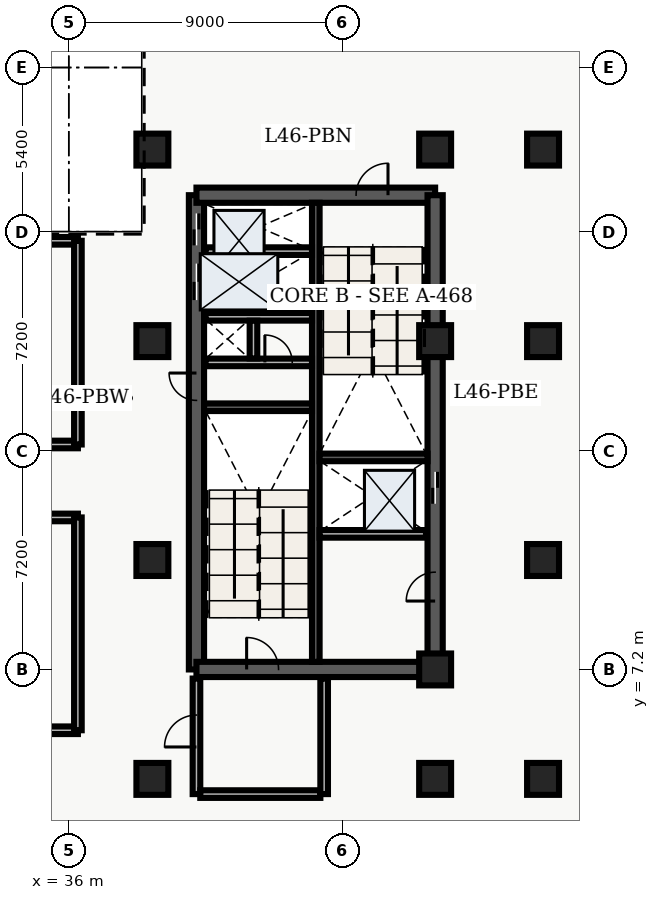
"""IFC4 building model, lengths in metres.
Left out: names, types, materials, properties, quantities, classifications, styles, units other than length and angle.
Written with IfcOpenShell. Run it as: python <this file> out.ifc"""

import sys

from ifc_helpers import new_model, entity, si_unit, converted_unit, direction, frame, origin_with_axes, origin_2d_with_axis, place, context, subcontext, project, spatial, polyline, rectangle, outline, extrude, element, fill, save


model = new_model("IFC4")
c1 = context("Model", 3, precision=1e-05, world=origin_with_axes(), true_north=direction((0.0, 1.0)))
c2 = subcontext(c1, "Body", "Model", "MODEL_VIEW")
j1 = project(units=[si_unit("LENGTHUNIT", "METRE"), converted_unit("PLANEANGLEUNIT", "DEGREE", entity("IfcPlaneAngleMeasure", 0.017), si_unit("PLANEANGLEUNIT", "RADIAN"), dimensions=[0, 0, 0, 0, 0, 0, 0])], contexts=[c1])
p1 = place(None, origin_with_axes())
s1 = spatial("IfcSite", under=j1, at=p1, CompositionType="ELEMENT")
p2 = place(p1, origin_with_axes())
s2 = spatial("IfcBuilding", under=s1, at=p2, CompositionType="ELEMENT")
p3 = place(p2, frame((0.0, 0.0, 187.5), z_axis=(0.0, 0.0, 1.0), x_axis=(1.0, 0.0, 0.0)))
s3 = spatial("IfcBuildingStorey", under=s2, at=p3, CompositionType="ELEMENT", Elevation=187.5)
p4 = place(p3, frame((40.2, 7.2, 0.0), z_axis=(0.0, 0.0, 1.0), x_axis=(0.0, 1.0, 0.0)))
e1 = element("IfcWall", 1, at=p4, inside=s3, PredefinedType="SHEAR", context=c2, shape_type="SweptSolid", body=[
    extrude(outline(polyline([(0.0, -0.25), (15.6, -0.25), (15.6, 0.25), (0.0, 0.25), (0.0, -0.25)])), origin_with_axes(), (0.0, 0.0, 1.0), 4.86),
])
p5 = place(p4, frame((14.475, 0.0, 0.0), z_axis=(0.0, 0.0, 1.0), x_axis=(1.0, 0.0, 0.0)))
e2 = element("IfcOpeningElement", 2, at=p5, cuts=e1, PredefinedType="OPENING", context=c2, shape_type="SweptSolid", body=[
    extrude(rectangle(XDim=1.05, YDim=0.52, at=origin_2d_with_axis()), origin_with_axes(), (0.0, 0.0, 1.0), 2.15),
])
p6 = place(p4, frame((12.75, 0.0, 0.0), z_axis=(0.0, 0.0, 1.0), x_axis=(1.0, 0.0, 0.0)))
e3 = element("IfcOpeningElement", 3, at=p6, cuts=e1, PredefinedType="OPENING", context=c2, shape_type="SweptSolid", body=[
    extrude(rectangle(XDim=1.2, YDim=0.52, at=origin_2d_with_axis()), origin_with_axes(), (0.0, 0.0, 1.0), 2.15),
])
p7 = place(p4, frame((9.3, 0.0, 0.0), z_axis=(0.0, 0.0, 1.0), x_axis=(1.0, 0.0, 0.0)))
e4 = element("IfcOpeningElement", 4, at=p7, cuts=e1, PredefinedType="OPENING", context=c2, shape_type="SweptSolid", body=[
    extrude(rectangle(XDim=0.9, YDim=0.52, at=origin_2d_with_axis()), origin_with_axes(), (0.0, 0.0, 1.0), 2.15),
])
p8 = place(p3, frame((40.2, 7.2, 0.0), z_axis=(0.0, 0.0, 1.0), x_axis=(1.0, 0.0, 0.0)))
e5 = element("IfcWall", 5, at=p8, inside=s3, PredefinedType="SHEAR", context=c2, shape_type="SweptSolid", body=[
    extrude(outline(polyline([(0.0, -0.25), (7.85, -0.25), (7.85, 0.25), (0.0, 0.25), (0.0, -0.25)])), origin_with_axes(), (0.0, 0.0, 1.0), 4.86),
])
p9 = place(p8, frame((2.175, 0.0, 0.0), z_axis=(0.0, 0.0, 1.0), x_axis=(1.0, 0.0, 0.0)))
e6 = element("IfcOpeningElement", 6, at=p9, cuts=e5, PredefinedType="OPENING", context=c2, shape_type="SweptSolid", body=[
    extrude(rectangle(XDim=1.05, YDim=0.52, at=origin_2d_with_axis()), origin_with_axes(), (0.0, 0.0, 1.0), 2.15),
])
p10 = place(p3, frame((40.2, 22.8, 0.0), z_axis=(0.0, 0.0, 1.0), x_axis=(1.0, 0.0, 0.0)))
e7 = element("IfcWall", 7, at=p10, inside=s3, PredefinedType="SHEAR", context=c2, shape_type="SweptSolid", body=[
    extrude(outline(polyline([(0.0, -0.25), (7.85, -0.25), (7.85, 0.25), (0.0, 0.25), (0.0, -0.25)])), origin_with_axes(), (0.0, 0.0, 1.0), 4.86),
])
p11 = place(p10, frame((5.775, 0.0, 0.0), z_axis=(0.0, 0.0, 1.0), x_axis=(1.0, 0.0, 0.0)))
e8 = element("IfcOpeningElement", 8, at=p11, cuts=e7, PredefinedType="OPENING", context=c2, shape_type="SweptSolid", body=[
    extrude(rectangle(XDim=1.05, YDim=0.52, at=origin_2d_with_axis()), origin_with_axes(), (0.0, 0.0, 1.0), 2.15),
])
p12 = place(p3, frame((48.05, 7.2, 0.0), z_axis=(0.0, 0.0, 1.0), x_axis=(0.0, 1.0, 0.0)))
e9 = element("IfcWall", 9, at=p12, inside=s3, PredefinedType="SHEAR", context=c2, shape_type="SweptSolid", body=[
    extrude(outline(polyline([(0.0, -0.25), (15.6, -0.25), (15.6, 0.25), (0.0, 0.25), (0.0, -0.25)])), origin_with_axes(), (0.0, 0.0, 1.0), 4.86),
])
p13 = place(p12, frame((5.975, 0.0, 0.0), z_axis=(0.0, 0.0, 1.0), x_axis=(1.0, 0.0, 0.0)))
e10 = element("IfcOpeningElement", 10, at=p13, cuts=e9, PredefinedType="OPENING", context=c2, shape_type="SweptSolid", body=[
    extrude(rectangle(XDim=1.05, YDim=0.52, at=origin_2d_with_axis()), origin_with_axes(), (0.0, 0.0, 1.0), 2.15),
])
p14 = place(p12, frame((2.725, 0.0, 0.0), z_axis=(0.0, 0.0, 1.0), x_axis=(1.0, 0.0, 0.0)))
e11 = element("IfcOpeningElement", 11, at=p14, cuts=e9, PredefinedType="OPENING", context=c2, shape_type="SweptSolid", body=[
    extrude(rectangle(XDim=0.95, YDim=0.52, at=origin_2d_with_axis()), origin_with_axes(), (0.0, 0.0, 1.0), 2.15),
])
p15 = place(p3, frame((44.125, 7.45, 0.0), z_axis=(0.0, 0.0, 1.0), x_axis=(0.0, 1.0, 0.0)))
e12 = element("IfcWall", 12, at=p15, inside=s3, PredefinedType="SHEAR", context=c2, shape_type="SweptSolid", body=[
    extrude(outline(polyline([(0.0, -0.125), (15.1, -0.125), (15.1, 0.125), (0.0, 0.125), (0.0, -0.125)])), origin_with_axes(), (0.0, 0.0, 1.0), 4.86),
])
for number, where, z_axis, x_axis in (
    (13, (40.45, 15.825, 0.0), (0.0, 0.0, 1.0), (1.0, 0.0, 0.0)),
    (14, (44.25, 14.175, 0.0), (0.0, 0.0, 1.0), (1.0, 0.0, 0.0)),
):
    element("IfcWall", number, at=place(p3, frame(where, z_axis=z_axis, x_axis=x_axis)), inside=s3, PredefinedType="SHEAR", context=c2, shape_type="SweptSolid", body=[
        extrude(outline(polyline([(0.0, -0.125), (3.55, -0.125), (3.55, 0.125), (0.0, 0.125), (0.0, -0.125)])), origin_with_axes(), (0.0, 0.0, 1.0), 4.86),
    ])
p16 = place(p3, frame((40.5, 17.3, 0.0), z_axis=(0.0, 0.0, 1.0), x_axis=(1.0, 0.0, 0.0)))
e15 = element("IfcWall", 15, at=p16, inside=s3, PredefinedType="SOLIDWALL", context=c2, shape_type="SweptSolid", body=[
    extrude(outline(polyline([(0.0, -0.125), (3.5, -0.125), (3.5, 0.125), (0.0, 0.125), (0.0, -0.125)])), origin_with_axes(), (0.0, 0.0, 1.0), 3.6),
])
p17 = place(p16, frame((2.4, 0.0, 0.0), z_axis=(0.0, 0.0, 1.0), x_axis=(1.0, 0.0, 0.0)))
e16 = element("IfcOpeningElement", 16, at=p17, cuts=e15, PredefinedType="OPENING", context=c2, shape_type="SweptSolid", body=[
    extrude(rectangle(XDim=0.9, YDim=0.27, at=origin_2d_with_axis()), origin_with_axes(), (0.0, 0.0, 1.0), 2.15),
])
p18 = place(p3, frame((40.5, 18.8, 0.0), z_axis=(0.0, 0.0, 1.0), x_axis=(1.0, 0.0, 0.0)))
e17 = element("IfcWall", 17, at=p18, inside=s3, PredefinedType="SOLIDWALL", context=c2, shape_type="SweptSolid", body=[
    extrude(outline(polyline([(0.0, -0.125), (3.5, -0.125), (3.5, 0.125), (0.0, 0.125), (0.0, -0.125)])), origin_with_axes(), (0.0, 0.0, 1.0), 3.6),
])
p19 = place(p3, frame((42.075, 17.43, 0.0), z_axis=(0.0, 0.0, 1.0), x_axis=(0.0, 1.0, 0.0)))
e18 = element("IfcWall", 18, at=p19, inside=s3, PredefinedType="SOLIDWALL", context=c2, shape_type="SweptSolid", body=[
    extrude(outline(polyline([(0.0, -0.125), (1.24, -0.125), (1.24, 0.125), (0.0, 0.125), (0.0, -0.125)])), origin_with_axes(), (0.0, 0.0, 1.0), 3.6),
])
p20 = place(p3, frame((40.2, 3.1, 0.0), z_axis=(0.0, 0.0, 1.0), x_axis=(0.0, 1.0, 0.0)))
e19 = element("IfcWall", 19, at=p20, inside=s3, PredefinedType="SOLIDWALL", context=c2, shape_type="SweptSolid", body=[
    extrude(outline(polyline([(0.0, -0.125), (3.8, -0.125), (3.8, 0.125), (0.0, 0.125), (0.0, -0.125)])), origin_with_axes(), (0.0, 0.0, 1.0), 3.6),
])
p21 = place(p20, frame((2.075, 0.0, 0.0), z_axis=(0.0, 0.0, 1.0), x_axis=(1.0, 0.0, 0.0)))
e20 = element("IfcOpeningElement", 20, at=p21, cuts=e19, PredefinedType="OPENING", context=c2, shape_type="SweptSolid", body=[
    extrude(rectangle(XDim=1.05, YDim=0.27, at=origin_2d_with_axis()), origin_with_axes(), (0.0, 0.0, 1.0), 2.15),
])
p22 = place(p3, frame((40.325, 3.1, 0.0), z_axis=(0.0, 0.0, 1.0), x_axis=(1.0, 0.0, 0.0)))
e21 = element("IfcWall", 21, at=p22, inside=s3, PredefinedType="SOLIDWALL", context=c2, shape_type="SweptSolid", body=[
    extrude(outline(polyline([(0.0, -0.125), (3.95, -0.125), (3.95, 0.125), (0.0, 0.125), (0.0, -0.125)])), origin_with_axes(), (0.0, 0.0, 1.0), 3.6),
])
p23 = place(p3, frame((44.4, 3.1, 0.0), z_axis=(0.0, 0.0, 1.0), x_axis=(0.0, 1.0, 0.0)))
e22 = element("IfcWall", 22, at=p23, inside=s3, PredefinedType="SOLIDWALL", context=c2, shape_type="SweptSolid", body=[
    extrude(outline(polyline([(0.0, -0.125), (3.8, -0.125), (3.8, 0.125), (0.0, 0.125), (0.0, -0.125)])), origin_with_axes(), (0.0, 0.0, 1.0), 3.6),
])
for number, where, z_axis, x_axis in (
    (23, (38.75, 3.6, 0.0), (0.0, 0.0, 1.0), (1.0, 0.0, 0.0)),
    (24, (38.75, 10.8, 0.0), (0.0, 0.0, 1.0), (1.0, 0.0, 0.0)),
    (25, (38.75, 18.0, 0.0), (0.0, 0.0, 1.0), (1.0, 0.0, 0.0)),
    (26, (38.75, 24.3, 0.0), (0.0, 0.0, 1.0), (1.0, 0.0, 0.0)),
    (27, (48.05, 3.6, 0.0), (0.0, 0.0, 1.0), (1.0, 0.0, 0.0)),
    (28, (48.05, 7.2, 0.0), (0.0, 0.0, 1.0), (1.0, 0.0, 0.0)),
    (29, (48.05, 18.0, 0.0), (0.0, 0.0, 1.0), (1.0, 0.0, 0.0)),
    (30, (48.05, 24.3, 0.0), (0.0, 0.0, 1.0), (1.0, 0.0, 0.0)),
    (31, (51.6, 3.6, 0.0), (0.0, 0.0, 1.0), (1.0, 0.0, 0.0)),
    (32, (51.6, 10.8, 0.0), (0.0, 0.0, 1.0), (1.0, 0.0, 0.0)),
    (33, (51.6, 18.0, 0.0), (0.0, 0.0, 1.0), (1.0, 0.0, 0.0)),
    (34, (51.6, 24.3, 0.0), (0.0, 0.0, 1.0), (1.0, 0.0, 0.0)),
):
    element("IfcColumn", number, at=place(p3, frame(where, z_axis=z_axis, x_axis=x_axis)), inside=s3, PredefinedType="COLUMN", context=c2, shape_type="SweptSolid", body=[
        extrude(rectangle(XDim=1.05, YDim=1.05, at=origin_2d_with_axis()), origin_with_axes(), (0.0, 0.0, 1.0), 5.1),
    ])
for number, where, z_axis, x_axis in (
    (35, (40.5, 20.96, 0.0), (0.0, 0.0, 1.0), (1.0, 0.0, 0.0)),
    (36, (44.25, 11.66, 0.0), (0.0, 0.0, 1.0), (1.0, 0.0, 0.0)),
):
    element("IfcWall", number, at=place(p3, frame(where, z_axis=z_axis, x_axis=x_axis)), inside=s3, PredefinedType="SOLIDWALL", context=c2, shape_type="SweptSolid", body=[
        extrude(outline(polyline([(0.0, -0.125), (3.5, -0.125), (3.5, 0.125), (0.0, 0.125), (0.0, -0.125)])), origin_with_axes(), (0.0, 0.0, 1.0), 3.2),
    ])
for number, where, z_axis, x_axis in (
    (37, (21.22, 21.3, 0.0), (0.0, 0.0, 1.0), (1.0, 0.0, 0.0)),
    (38, (21.22, 12.2, 0.0), (0.0, 0.0, 1.0), (1.0, 0.0, 0.0)),
):
    element("IfcWall", number, at=place(p3, frame(where, z_axis=z_axis, x_axis=x_axis)), inside=s3, PredefinedType="SOLIDWALL", context=c2, shape_type="SweptSolid", body=[
        extrude(outline(polyline([(0.0, -0.125), (15.08, -0.125), (15.08, 0.125), (0.0, 0.125), (0.0, -0.125)])), origin_with_axes(), (0.0, 0.0, 1.0), 3.2),
    ])
p24 = place(p3, frame((21.22, 14.6, 0.0), z_axis=(0.0, 0.0, 1.0), x_axis=(1.0, 0.0, 0.0)))
e39 = element("IfcWall", 39, at=p24, inside=s3, PredefinedType="SOLIDWALL", context=c2, shape_type="SweptSolid", body=[
    extrude(outline(polyline([(0.0, -0.125), (15.08, -0.125), (15.08, 0.125), (0.0, 0.125), (0.0, -0.125)])), origin_with_axes(), (0.0, 0.0, 1.0), 3.2),
])
p25 = place(p24, frame((7.75, 0.0, 0.0), z_axis=(0.0, 0.0, 1.0), x_axis=(1.0, 0.0, 0.0)))
e40 = element("IfcOpeningElement", 40, at=p25, cuts=e39, PredefinedType="OPENING", context=c2, shape_type="SweptSolid", body=[
    extrude(rectangle(XDim=1.1, YDim=0.27, at=origin_2d_with_axis()), origin_with_axes(), (0.0, 0.0, 1.0), 2.15),
])
p26 = place(p3, frame((36.3, 14.6, 0.0), z_axis=(0.0, 0.0, 1.0), x_axis=(0.0, 1.0, 0.0)))
e41 = element("IfcWall", 41, at=p26, inside=s3, PredefinedType="SOLIDWALL", context=c2, shape_type="SweptSolid", body=[
    extrude(outline(polyline([(0.0, -0.125), (6.7, -0.125), (6.7, 0.125), (0.0, 0.125), (0.0, -0.125)])), origin_with_axes(), (0.0, 0.0, 1.0), 3.2),
])
p27 = place(p3, frame((21.22, 5.2, 0.0), z_axis=(0.0, 0.0, 1.0), x_axis=(1.0, 0.0, 0.0)))
e42 = element("IfcWall", 42, at=p27, inside=s3, PredefinedType="SOLIDWALL", context=c2, shape_type="SweptSolid", body=[
    extrude(outline(polyline([(0.0, -0.125), (15.08, -0.125), (15.08, 0.125), (0.0, 0.125), (0.0, -0.125)])), origin_with_axes(), (0.0, 0.0, 1.0), 3.2),
])
p28 = place(p3, frame((36.3, 5.2, 0.0), z_axis=(0.0, 0.0, 1.0), x_axis=(0.0, 1.0, 0.0)))
e43 = element("IfcWall", 43, at=p28, inside=s3, PredefinedType="SOLIDWALL", context=c2, shape_type="SweptSolid", body=[
    extrude(outline(polyline([(0.0, -0.125), (7.0, -0.125), (7.0, 0.125), (0.0, 0.125), (0.0, -0.125)])), origin_with_axes(), (0.0, 0.0, 1.0), 3.2),
])
p29 = place(p12, frame((5.975, 0.0, 0.0), z_axis=(0.0, 0.0, 1.0), x_axis=(1.0, 0.0, 0.0)))
e44 = element("IfcDoor", 44, at=p29, inside=s3, OperationType="SLIDING_TO_LEFT", PredefinedType="DOOR", context=c2, shape_type="SweptSolid", body=[
    extrude(rectangle(XDim=1.05, YDim=0.09, at=origin_2d_with_axis()), origin_with_axes(), (0.0, 0.0, 1.0), 2.15),
])
fill(e10, e44)
p30 = place(p4, frame((14.475, 0.0, 0.0), z_axis=(0.0, 0.0, 1.0), x_axis=(1.0, 0.0, 0.0)))
e45 = element("IfcDoor", 45, at=p30, inside=s3, OperationType="SLIDING_TO_RIGHT", PredefinedType="DOOR", context=c2, shape_type="SweptSolid", body=[
    extrude(rectangle(XDim=1.05, YDim=0.09, at=origin_2d_with_axis()), origin_with_axes(), (0.0, 0.0, 1.0), 2.15),
])
fill(e2, e45)
p31 = place(p4, frame((12.75, 0.0, 0.0), z_axis=(0.0, 0.0, 1.0), x_axis=(1.0, 0.0, 0.0)))
e46 = element("IfcDoor", 46, at=p31, inside=s3, OperationType="DOUBLE_DOOR_SLIDING", PredefinedType="DOOR", context=c2, shape_type="SweptSolid", body=[
    extrude(rectangle(XDim=1.2, YDim=0.09, at=origin_2d_with_axis()), origin_with_axes(), (0.0, 0.0, 1.0), 2.15),
])
fill(e3, e46)
p32 = place(p4, frame((9.3, 0.0, 0.0), z_axis=(0.0, 0.0, 1.0), x_axis=(1.0, 0.0, 0.0)))
e47 = element("IfcDoor", 47, at=p32, inside=s3, OperationType="SINGLE_SWING_RIGHT", PredefinedType="DOOR", context=c2, shape_type="SweptSolid", body=[
    extrude(rectangle(XDim=0.9, YDim=0.09, at=origin_2d_with_axis()), origin_with_axes(), (0.0, 0.0, 1.0), 2.15),
])
fill(e4, e47)
p33 = place(p16, frame((2.4, 0.0, 0.0), z_axis=(0.0, 0.0, 1.0), x_axis=(1.0, 0.0, 0.0)))
e48 = element("IfcDoor", 48, at=p33, inside=s3, OperationType="SINGLE_SWING_LEFT", PredefinedType="DOOR", context=c2, shape_type="SweptSolid", body=[
    extrude(rectangle(XDim=0.9, YDim=0.09, at=origin_2d_with_axis()), origin_with_axes(), (0.0, 0.0, 1.0), 2.15),
])
fill(e16, e48)
p34 = place(p8, frame((2.175, 0.0, 0.0), z_axis=(0.0, 0.0, 1.0), x_axis=(1.0, 0.0, 0.0)))
e49 = element("IfcDoor", 49, at=p34, inside=s3, OperationType="SINGLE_SWING_LEFT", PredefinedType="DOOR", context=c2, shape_type="SweptSolid", body=[
    extrude(rectangle(XDim=1.05, YDim=0.09, at=origin_2d_with_axis()), origin_with_axes(), (0.0, 0.0, 1.0), 2.15),
])
fill(e6, e49)
p35 = place(p10, frame((5.775, 0.0, 0.0), z_axis=(0.0, 0.0, 1.0), x_axis=(1.0, 0.0, 0.0)))
e50 = element("IfcDoor", 50, at=p35, inside=s3, OperationType="SINGLE_SWING_RIGHT", PredefinedType="DOOR", context=c2, shape_type="SweptSolid", body=[
    extrude(rectangle(XDim=1.05, YDim=0.09, at=origin_2d_with_axis()), origin_with_axes(), (0.0, 0.0, 1.0), 2.15),
])
fill(e8, e50)
p36 = place(p20, frame((2.075, 0.0, 0.0), z_axis=(0.0, 0.0, 1.0), x_axis=(1.0, 0.0, 0.0)))
e51 = element("IfcDoor", 51, at=p36, inside=s3, OperationType="SINGLE_SWING_LEFT", PredefinedType="DOOR", context=c2, shape_type="SweptSolid", body=[
    extrude(rectangle(XDim=1.05, YDim=0.09, at=origin_2d_with_axis()), origin_with_axes(), (0.0, 0.0, 1.0), 2.15),
])
fill(e20, e51)
p37 = place(p12, frame((2.725, 0.0, 0.0), z_axis=(0.0, 0.0, 1.0), x_axis=(1.0, 0.0, 0.0)))
e52 = element("IfcDoor", 52, at=p37, inside=s3, OperationType="SINGLE_SWING_LEFT", PredefinedType="DOOR", context=c2, shape_type="SweptSolid", body=[
    extrude(rectangle(XDim=0.95, YDim=0.09, at=origin_2d_with_axis()), origin_with_axes(), (0.0, 0.0, 1.0), 2.15),
])
fill(e11, e52)
save(model, sys.argv[1])
